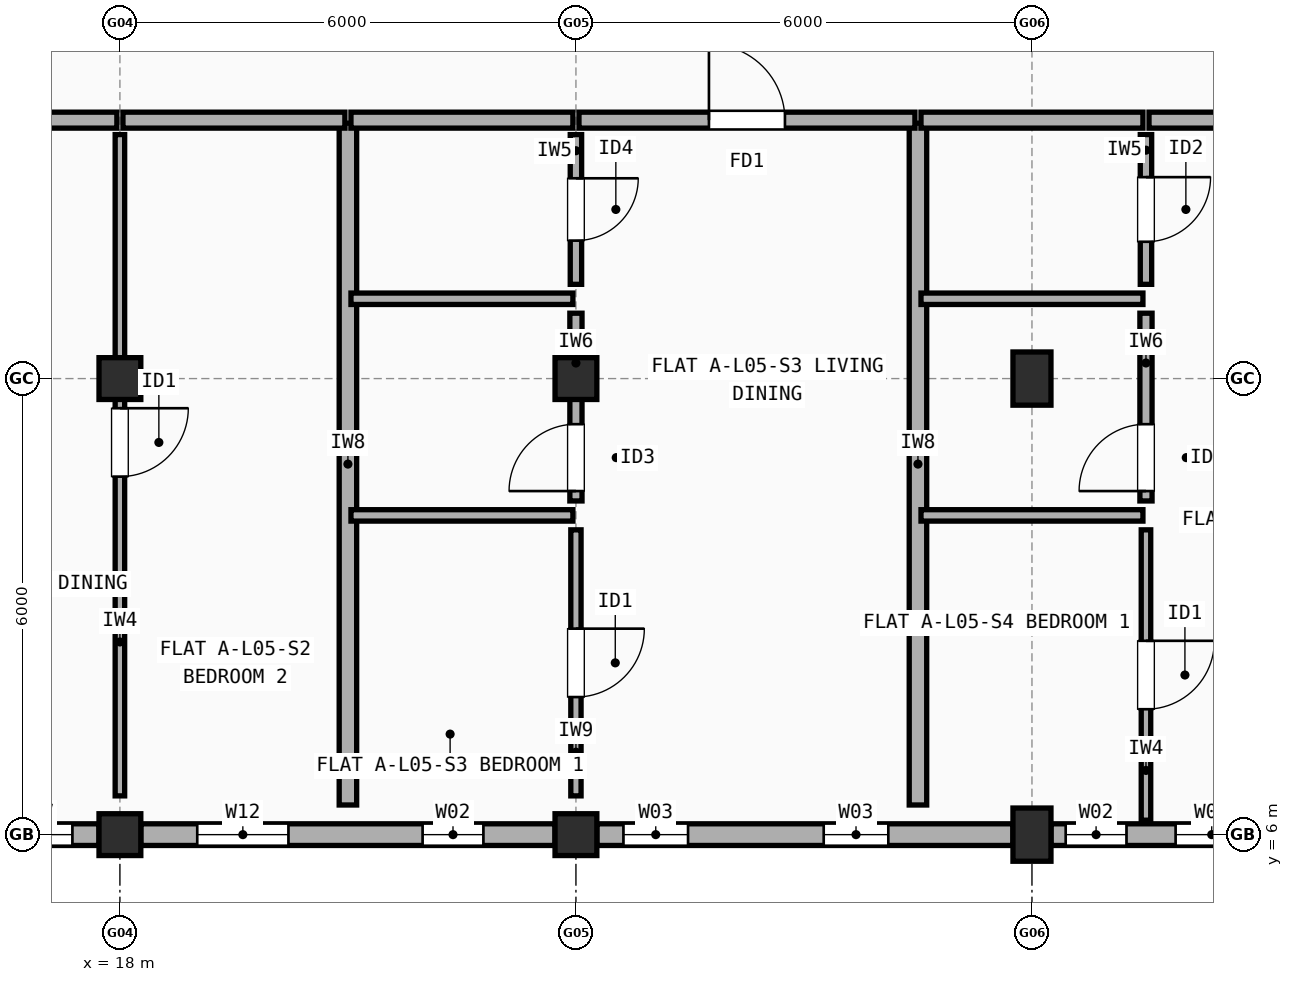
"""IFC4 building model, lengths in metres.
Left out: names, types, materials, properties, quantities, classifications, styles, units other than length and angle.
Written with IfcOpenShell. Run it as: python <this file> out.ifc"""

import sys

from ifc_helpers import new_model, si_unit, direction, frame, frame_2d, origin, origin_2d, place, context, subcontext, project, spatial, rectangle, extrude, element, fill, save


model = new_model("IFC4")
c1 = context("Model", 3, precision=1e-05, world=origin(), true_north=direction((0.0, 1.0)))
c2 = subcontext(c1, "Body", "Model", "MODEL_VIEW")
j1 = project(units=[si_unit("LENGTHUNIT", "METRE"), si_unit("PLANEANGLEUNIT", "RADIAN")], contexts=[c1])
p1 = place(None, origin())
s1 = spatial("IfcSite", under=j1, at=p1, CompositionType="ELEMENT")
p2 = place(p1, origin())
s2 = spatial("IfcBuilding", under=s1, at=p2, CompositionType="ELEMENT")
p3 = place(p2, frame((0.0, 0.0, 17.3)))
s3 = spatial("IfcBuildingStorey", under=s2, at=p3, CompositionType="ELEMENT", Elevation=17.3)
for number, where, z_axis, x_axis in (
    (1, (18.0, 6.0, 0.0), (0.0, 0.0, 1.0), (1.0, 0.0, 0.0)),
    (2, (18.0, 12.0, 0.0), (0.0, 0.0, 1.0), (1.0, 0.0, 0.0)),
    (3, (24.0, 6.0, 0.0), (0.0, 0.0, 1.0), (1.0, 0.0, 0.0)),
    (4, (24.0, 12.0, 0.0), (0.0, 0.0, 1.0), (1.0, 0.0, 0.0)),
):
    element("IfcColumn", number, at=place(p3, frame(where, z_axis=z_axis, x_axis=x_axis)), inside=s3, PredefinedType="COLUMN", context=c2, shape_type="SweptSolid", body=[
        extrude(rectangle(XDim=0.55, YDim=0.55, at=origin_2d()), origin(), (0.0, 0.0, 1.0), 2.965),
    ])
for number, where, z_axis, x_axis in (
    (5, (30.0, 6.0, 0.0), (0.0, 0.0, 1.0), (1.0, 0.0, 0.0)),
    (6, (30.0, 12.0, 0.0), (0.0, 0.0, 1.0), (1.0, 0.0, 0.0)),
):
    element("IfcColumn", number, at=place(p3, frame(where, z_axis=z_axis, x_axis=x_axis)), inside=s3, PredefinedType="COLUMN", context=c2, shape_type="SweptSolid", body=[
        extrude(rectangle(XDim=0.5, YDim=0.7, at=origin_2d()), origin(), (0.0, 0.0, 1.0), 2.965),
    ])
p4 = place(p3, frame((12.275, 6.0, 0.0), z_axis=(0.0, 0.0, 1.0), x_axis=(1.0, 0.0, 0.0)))
e7 = element("IfcWall", 7, at=p4, inside=s3, PredefinedType="STANDARD", context=c2, shape_type="SweptSolid", body=[
    extrude(rectangle(XDim=5.45, YDim=0.285, at=frame_2d((2.725, 0.0))), origin(), (0.0, 0.0, 1.0), 2.447),
])
p5 = place(p4, frame((1.615, 0.0, 0.9)))
e8 = element("IfcOpeningElement", 8, at=p5, cuts=e7, PredefinedType="OPENING", context=c2, shape_type="SweptSolid", body=[
    extrude(rectangle(XDim=0.95, YDim=1.35, at=frame_2d((0.475, 0.675))), frame((0.0, 0.152, 0.0), z_axis=(0.0, -1.0, 0.0), x_axis=(1.0, 0.0, 0.0)), (0.0, 0.0, 1.0), 0.305),
])
p6 = place(p4, frame((4.15, 0.0, 0.9)))
e9 = element("IfcOpeningElement", 9, at=p6, cuts=e7, PredefinedType="OPENING", context=c2, shape_type="SweptSolid", body=[
    extrude(rectangle(XDim=0.95, YDim=1.35, at=frame_2d((0.475, 0.675))), frame((0.0, 0.152, 0.0), z_axis=(0.0, -1.0, 0.0), x_axis=(1.0, 0.0, 0.0)), (0.0, 0.0, 1.0), 0.305),
])
p7 = place(p3, frame((18.275, 6.0, 0.0), z_axis=(0.0, 0.0, 1.0), x_axis=(1.0, 0.0, 0.0)))
e10 = element("IfcWall", 10, at=p7, inside=s3, PredefinedType="STANDARD", context=c2, shape_type="SweptSolid", body=[
    extrude(rectangle(XDim=5.45, YDim=0.285, at=frame_2d((2.725, 0.0))), origin(), (0.0, 0.0, 1.0), 2.447),
])
p8 = place(p7, frame((0.742, 0.0, 0.9)))
e11 = element("IfcOpeningElement", 11, at=p8, cuts=e10, PredefinedType="OPENING", context=c2, shape_type="SweptSolid", body=[
    extrude(rectangle(XDim=1.2, YDim=1.35, at=frame_2d((0.6, 0.675))), frame((0.0, 0.152, 0.0), z_axis=(0.0, -1.0, 0.0), x_axis=(1.0, 0.0, 0.0)), (0.0, 0.0, 1.0), 0.305),
])
p9 = place(p7, frame((3.708, 0.0, 0.9)))
e12 = element("IfcOpeningElement", 12, at=p9, cuts=e10, PredefinedType="OPENING", context=c2, shape_type="SweptSolid", body=[
    extrude(rectangle(XDim=0.8, YDim=1.2, at=frame_2d((0.4, 0.6))), frame((0.0, 0.152, 0.0), z_axis=(0.0, -1.0, 0.0), x_axis=(1.0, 0.0, 0.0)), (0.0, 0.0, 1.0), 0.305),
])
p10 = place(p3, frame((24.275, 6.0, 0.0), z_axis=(0.0, 0.0, 1.0), x_axis=(1.0, 0.0, 0.0)))
e13 = element("IfcWall", 13, at=p10, inside=s3, PredefinedType="STANDARD", context=c2, shape_type="SweptSolid", body=[
    extrude(rectangle(XDim=5.475, YDim=0.285, at=frame_2d((2.738, 0.0))), origin(), (0.0, 0.0, 1.0), 2.447),
])
p11 = place(p10, frame((0.35, 0.0, 0.9)))
e14 = element("IfcOpeningElement", 14, at=p11, cuts=e13, PredefinedType="OPENING", context=c2, shape_type="SweptSolid", body=[
    extrude(rectangle(XDim=0.85, YDim=1.25, at=frame_2d((0.425, 0.625))), frame((0.0, 0.152, 0.0), z_axis=(0.0, -1.0, 0.0), x_axis=(1.0, 0.0, 0.0)), (0.0, 0.0, 1.0), 0.305),
])
p12 = place(p10, frame((2.985, 0.0, 0.9)))
e15 = element("IfcOpeningElement", 15, at=p12, cuts=e13, PredefinedType="OPENING", context=c2, shape_type="SweptSolid", body=[
    extrude(rectangle(XDim=0.85, YDim=1.25, at=frame_2d((0.425, 0.625))), frame((0.0, 0.152, 0.0), z_axis=(0.0, -1.0, 0.0), x_axis=(1.0, 0.0, 0.0)), (0.0, 0.0, 1.0), 0.305),
])
p13 = place(p3, frame((30.25, 6.0, 0.0), z_axis=(0.0, 0.0, 1.0), x_axis=(1.0, 0.0, 0.0)))
e16 = element("IfcWall", 16, at=p13, inside=s3, PredefinedType="STANDARD", context=c2, shape_type="SweptSolid", body=[
    extrude(rectangle(XDim=5.5, YDim=0.285, at=frame_2d((2.75, 0.0))), origin(), (0.0, 0.0, 1.0), 2.447),
])
p14 = place(p13, frame((1.64, 0.0, 0.9)))
e17 = element("IfcOpeningElement", 17, at=p14, cuts=e16, PredefinedType="OPENING", context=c2, shape_type="SweptSolid", body=[
    extrude(rectangle(XDim=0.95, YDim=1.35, at=frame_2d((0.475, 0.675))), frame((0.0, 0.152, 0.0), z_axis=(0.0, -1.0, 0.0), x_axis=(1.0, 0.0, 0.0)), (0.0, 0.0, 1.0), 0.305),
])
p15 = place(p13, frame((4.2, 0.0, 0.9)))
e18 = element("IfcOpeningElement", 18, at=p15, cuts=e16, PredefinedType="OPENING", context=c2, shape_type="SweptSolid", body=[
    extrude(rectangle(XDim=0.95, YDim=1.35, at=frame_2d((0.475, 0.675))), frame((0.0, 0.152, 0.0), z_axis=(0.0, -1.0, 0.0), x_axis=(1.0, 0.0, 0.0)), (0.0, 0.0, 1.0), 0.305),
])
p16 = place(p13, frame((0.194, 0.0, 0.9)))
e19 = element("IfcOpeningElement", 19, at=p16, cuts=e16, PredefinedType="OPENING", context=c2, shape_type="SweptSolid", body=[
    extrude(rectangle(XDim=0.8, YDim=1.2, at=frame_2d((0.4, 0.6))), frame((0.0, 0.152, 0.0), z_axis=(0.0, -1.0, 0.0), x_axis=(1.0, 0.0, 0.0)), (0.0, 0.0, 1.0), 0.305),
])
p17 = place(p3, frame((21.0, 6.39, 0.0), z_axis=(0.0, 0.0, 1.0), x_axis=(0.0, 1.0, 0.0)))
e20 = element("IfcWall", 20, at=p17, inside=s3, PredefinedType="SOLIDWALL", context=c2, shape_type="SweptSolid", body=[
    extrude(rectangle(XDim=8.97, YDim=0.23, at=frame_2d((4.485, 0.0))), origin(), (0.0, 0.0, 1.0), 2.408),
])
p18 = place(p3, frame((13.54, 15.4, 0.0), z_axis=(0.0, 0.0, 1.0), x_axis=(1.0, 0.0, 0.0)))
e21 = element("IfcWall", 21, at=p18, inside=s3, PredefinedType="SOLIDWALL", context=c2, shape_type="SweptSolid", body=[
    extrude(rectangle(XDim=4.42, YDim=0.21, at=frame_2d((2.21, 0.0))), origin(), (0.0, 0.0, 1.0), 2.508),
])
p19 = place(p18, frame((1.72, 0.0, 0.0)))
e22 = element("IfcOpeningElement", 22, at=p19, cuts=e21, PredefinedType="OPENING", context=c2, shape_type="SweptSolid", body=[
    extrude(rectangle(XDim=0.98, YDim=2.15, at=frame_2d((0.49, 1.075))), frame((0.0, 0.115, 0.0), z_axis=(0.0, -1.0, 0.0), x_axis=(1.0, 0.0, 0.0)), (0.0, 0.0, 1.0), 0.23),
])
p20 = place(p3, frame((18.04, 15.4, 0.0), z_axis=(0.0, 0.0, 1.0), x_axis=(1.0, 0.0, 0.0)))
e23 = element("IfcWall", 23, at=p20, inside=s3, PredefinedType="SOLIDWALL", context=c2, shape_type="SweptSolid", body=[
    extrude(rectangle(XDim=2.92, YDim=0.21, at=frame_2d((1.46, 0.0))), origin(), (0.0, 0.0, 1.0), 2.508),
])
p21 = place(p3, frame((18.0, 6.51, 0.0), z_axis=(0.0, 0.0, 1.0), x_axis=(0.0, 1.0, 0.0)))
e24 = element("IfcWall", 24, at=p21, inside=s3, PredefinedType="PARTITIONING", context=c2, shape_type="SweptSolid", body=[
    extrude(rectangle(XDim=8.7, YDim=0.125, at=frame_2d((4.35, 0.0))), origin(), (0.0, 0.0, 1.0), 2.508),
])
p22 = place(p21, frame((4.2, 0.0, 0.0)))
e25 = element("IfcOpeningElement", 25, at=p22, cuts=e24, PredefinedType="OPENING", context=c2, shape_type="SweptSolid", body=[
    extrude(rectangle(XDim=0.9, YDim=2.1, at=frame_2d((0.45, 1.05))), frame((0.0, 0.073, 0.0), z_axis=(0.0, -1.0, 0.0), x_axis=(1.0, 0.0, 0.0)), (0.0, 0.0, 1.0), 0.145),
])
p23 = place(p3, frame((28.5, 6.39, 0.0), z_axis=(0.0, 0.0, 1.0), x_axis=(0.0, 1.0, 0.0)))
e26 = element("IfcWall", 26, at=p23, inside=s3, PredefinedType="SOLIDWALL", context=c2, shape_type="SweptSolid", body=[
    extrude(rectangle(XDim=8.97, YDim=0.23, at=frame_2d((4.485, 0.0))), origin(), (0.0, 0.0, 1.0), 2.548),
])
p24 = place(p3, frame((21.04, 15.4, 0.0), z_axis=(0.0, 0.0, 1.0), x_axis=(1.0, 0.0, 0.0)))
e27 = element("IfcWall", 27, at=p24, inside=s3, PredefinedType="SOLIDWALL", context=c2, shape_type="SweptSolid", body=[
    extrude(rectangle(XDim=2.92, YDim=0.21, at=frame_2d((1.46, 0.0))), origin(), (0.0, 0.0, 1.0), 2.458),
])
p25 = place(p3, frame((24.04, 15.4, 0.0), z_axis=(0.0, 0.0, 1.0), x_axis=(1.0, 0.0, 0.0)))
e28 = element("IfcWall", 28, at=p25, inside=s3, PredefinedType="SOLIDWALL", context=c2, shape_type="SweptSolid", body=[
    extrude(rectangle(XDim=4.42, YDim=0.21, at=frame_2d((2.21, 0.0))), origin(), (0.0, 0.0, 1.0), 2.458),
])
p26 = place(p25, frame((1.71, 0.0, 0.0)))
e29 = element("IfcOpeningElement", 29, at=p26, cuts=e28, PredefinedType="OPENING", context=c2, shape_type="SweptSolid", body=[
    extrude(rectangle(XDim=1.0, YDim=2.15, at=frame_2d((0.5, 1.075))), frame((0.0, 0.115, 0.0), z_axis=(0.0, -1.0, 0.0), x_axis=(1.0, 0.0, 0.0)), (0.0, 0.0, 1.0), 0.23),
])
p27 = place(p3, frame((24.0, 6.51, 0.0), z_axis=(0.0, 0.0, 1.0), x_axis=(0.0, 1.0, 0.0)))
e30 = element("IfcWall", 30, at=p27, inside=s3, PredefinedType="PARTITIONING", context=c2, shape_type="SweptSolid", body=[
    extrude(rectangle(XDim=3.5, YDim=0.135, at=frame_2d((1.75, 0.0))), origin(), (0.0, 0.0, 1.0), 2.508),
])
p28 = place(p27, frame((1.3, 0.0, 0.0)))
e31 = element("IfcOpeningElement", 31, at=p28, cuts=e30, PredefinedType="OPENING", context=c2, shape_type="SweptSolid", body=[
    extrude(rectangle(XDim=0.9, YDim=2.1, at=frame_2d((0.45, 1.05))), frame((0.0, 0.077, 0.0), z_axis=(0.0, -1.0, 0.0), x_axis=(1.0, 0.0, 0.0)), (0.0, 0.0, 1.0), 0.155),
])
p29 = place(p3, frame((24.0, 10.39, 0.0), z_axis=(0.0, 0.0, 1.0), x_axis=(0.0, 1.0, 0.0)))
e32 = element("IfcWall", 32, at=p29, inside=s3, PredefinedType="PLUMBINGWALL", context=c2, shape_type="SweptSolid", body=[
    extrude(rectangle(XDim=2.47, YDim=0.16, at=frame_2d((1.235, 0.0))), origin(), (0.0, 0.0, 1.0), 2.458),
])
p30 = place(p29, frame((0.13, 0.0, 0.0)))
e33 = element("IfcOpeningElement", 33, at=p30, cuts=e32, PredefinedType="OPENING", context=c2, shape_type="SweptSolid", body=[
    extrude(rectangle(XDim=0.88, YDim=2.1, at=frame_2d((0.44, 1.05))), frame((0.0, 0.09, 0.0), z_axis=(0.0, -1.0, 0.0), x_axis=(1.0, 0.0, 0.0)), (0.0, 0.0, 1.0), 0.18),
])
p31 = place(p3, frame((24.0, 13.24, 0.0), z_axis=(0.0, 0.0, 1.0), x_axis=(0.0, 1.0, 0.0)))
e34 = element("IfcWall", 34, at=p31, inside=s3, PredefinedType="PARTITIONING", context=c2, shape_type="SweptSolid", body=[
    extrude(rectangle(XDim=1.97, YDim=0.15, at=frame_2d((0.985, 0.0))), origin(), (0.0, 0.0, 1.0), 2.458),
])
p32 = place(p31, frame((0.575, 0.0, 0.0)))
e35 = element("IfcOpeningElement", 35, at=p32, cuts=e34, PredefinedType="OPENING", context=c2, shape_type="SweptSolid", body=[
    extrude(rectangle(XDim=0.82, YDim=2.08, at=frame_2d((0.41, 1.04))), frame((0.0, 0.085, 0.0), z_axis=(0.0, -1.0, 0.0), x_axis=(1.0, 0.0, 0.0)), (0.0, 0.0, 1.0), 0.17),
])
p33 = place(p3, frame((21.04, 10.2, 0.0), z_axis=(0.0, 0.0, 1.0), x_axis=(1.0, 0.0, 0.0)))
e36 = element("IfcWall", 36, at=p33, inside=s3, PredefinedType="PARTITIONING", context=c2, shape_type="SweptSolid", body=[
    extrude(rectangle(XDim=2.92, YDim=0.15, at=frame_2d((1.46, 0.0))), origin(), (0.0, 0.0, 1.0), 2.508),
])
p34 = place(p3, frame((21.04, 13.05, 0.0), z_axis=(0.0, 0.0, 1.0), x_axis=(1.0, 0.0, 0.0)))
e37 = element("IfcWall", 37, at=p34, inside=s3, PredefinedType="PARTITIONING", context=c2, shape_type="SweptSolid", body=[
    extrude(rectangle(XDim=2.92, YDim=0.15, at=frame_2d((1.46, 0.0))), origin(), (0.0, 0.0, 1.0), 2.458),
])
p35 = place(p3, frame((28.54, 15.4, 0.0), z_axis=(0.0, 0.0, 1.0), x_axis=(1.0, 0.0, 0.0)))
e38 = element("IfcWall", 38, at=p35, inside=s3, PredefinedType="SOLIDWALL", context=c2, shape_type="SweptSolid", body=[
    extrude(rectangle(XDim=2.92, YDim=0.21, at=frame_2d((1.46, 0.0))), origin(), (0.0, 0.0, 1.0), 2.447),
])
p36 = place(p3, frame((31.54, 15.4, 0.0), z_axis=(0.0, 0.0, 1.0), x_axis=(1.0, 0.0, 0.0)))
e39 = element("IfcWall", 39, at=p36, inside=s3, PredefinedType="SOLIDWALL", context=c2, shape_type="SweptSolid", body=[
    extrude(rectangle(XDim=4.42, YDim=0.21, at=frame_2d((2.21, 0.0))), origin(), (0.0, 0.0, 1.0), 2.447),
])
p37 = place(p36, frame((1.72, 0.0, 0.0)))
e40 = element("IfcOpeningElement", 40, at=p37, cuts=e39, PredefinedType="OPENING", context=c2, shape_type="SweptSolid", body=[
    extrude(rectangle(XDim=0.98, YDim=2.15, at=frame_2d((0.49, 1.075))), frame((0.0, 0.115, 0.0), z_axis=(0.0, -1.0, 0.0), x_axis=(1.0, 0.0, 0.0)), (0.0, 0.0, 1.0), 0.23),
])
p38 = place(p3, frame((31.5, 6.19, 0.0), z_axis=(0.0, 0.0, 1.0), x_axis=(0.0, 1.0, 0.0)))
e41 = element("IfcWall", 41, at=p38, inside=s3, PredefinedType="PARTITIONING", context=c2, shape_type="SweptSolid", body=[
    extrude(rectangle(XDim=3.82, YDim=0.125, at=frame_2d((1.91, 0.0))), origin(), (0.0, 0.0, 1.0), 2.965),
])
p39 = place(p38, frame((1.46, 0.0, 0.0)))
e42 = element("IfcOpeningElement", 42, at=p39, cuts=e41, PredefinedType="OPENING", context=c2, shape_type="SweptSolid", body=[
    extrude(rectangle(XDim=0.9, YDim=2.1, at=frame_2d((0.45, 1.05))), frame((0.0, 0.073, 0.0), z_axis=(0.0, -1.0, 0.0), x_axis=(1.0, 0.0, 0.0)), (0.0, 0.0, 1.0), 0.145),
])
p40 = place(p3, frame((31.5, 10.39, 0.0), z_axis=(0.0, 0.0, 1.0), x_axis=(0.0, 1.0, 0.0)))
e43 = element("IfcWall", 43, at=p40, inside=s3, PredefinedType="PLUMBINGWALL", context=c2, shape_type="SweptSolid", body=[
    extrude(rectangle(XDim=2.47, YDim=0.16, at=frame_2d((1.235, 0.0))), origin(), (0.0, 0.0, 1.0), 2.508),
])
p41 = place(p40, frame((0.13, 0.0, 0.0)))
e44 = element("IfcOpeningElement", 44, at=p41, cuts=e43, PredefinedType="OPENING", context=c2, shape_type="SweptSolid", body=[
    extrude(rectangle(XDim=0.88, YDim=2.1, at=frame_2d((0.44, 1.05))), frame((0.0, 0.09, 0.0), z_axis=(0.0, -1.0, 0.0), x_axis=(1.0, 0.0, 0.0)), (0.0, 0.0, 1.0), 0.18),
])
p42 = place(p3, frame((31.5, 13.24, 0.0), z_axis=(0.0, 0.0, 1.0), x_axis=(0.0, 1.0, 0.0)))
e45 = element("IfcWall", 45, at=p42, inside=s3, PredefinedType="PARTITIONING", context=c2, shape_type="SweptSolid", body=[
    extrude(rectangle(XDim=1.97, YDim=0.15, at=frame_2d((0.985, 0.0))), origin(), (0.0, 0.0, 1.0), 2.965),
])
p43 = place(p42, frame((0.56, 0.0, 0.0)))
e46 = element("IfcOpeningElement", 46, at=p43, cuts=e45, PredefinedType="OPENING", context=c2, shape_type="SweptSolid", body=[
    extrude(rectangle(XDim=0.85, YDim=2.1, at=frame_2d((0.425, 1.05))), frame((0.0, 0.085, 0.0), z_axis=(0.0, -1.0, 0.0), x_axis=(1.0, 0.0, 0.0)), (0.0, 0.0, 1.0), 0.17),
])
for number, where, z_axis, x_axis in (
    (47, (28.54, 10.2, 0.0), (0.0, 0.0, 1.0), (1.0, 0.0, 0.0)),
    (48, (28.54, 13.05, 0.0), (0.0, 0.0, 1.0), (1.0, 0.0, 0.0)),
):
    element("IfcWall", number, at=place(p3, frame(where, z_axis=z_axis, x_axis=x_axis)), inside=s3, PredefinedType="PARTITIONING", context=c2, shape_type="SweptSolid", body=[
        extrude(rectangle(XDim=2.92, YDim=0.15, at=frame_2d((1.46, 0.0))), origin(), (0.0, 0.0, 1.0), 2.447),
    ])
p44 = place(p6, origin())
e49 = element("IfcWindow", 49, at=p44, inside=s3, PartitioningType="SINGLE_PANEL", PredefinedType="WINDOW", context=c2, shape_type="SweptSolid", body=[
    extrude(rectangle(XDim=0.95, YDim=1.35, at=frame_2d((0.475, 0.675))), frame((0.0, 0.03, 0.0), z_axis=(0.0, -1.0, 0.0), x_axis=(1.0, 0.0, 0.0)), (0.0, 0.0, 1.0), 0.06),
])
fill(e9, e49)
p45 = place(p8, origin())
e50 = element("IfcWindow", 50, at=p45, inside=s3, PartitioningType="SINGLE_PANEL", PredefinedType="WINDOW", context=c2, shape_type="SweptSolid", body=[
    extrude(rectangle(XDim=1.2, YDim=1.35, at=frame_2d((0.6, 0.675))), frame((0.0, 0.03, 0.0), z_axis=(0.0, -1.0, 0.0), x_axis=(1.0, 0.0, 0.0)), (0.0, 0.0, 1.0), 0.06),
])
fill(e11, e50)
p46 = place(p9, origin())
e51 = element("IfcWindow", 51, at=p46, inside=s3, PartitioningType="SINGLE_PANEL", PredefinedType="WINDOW", context=c2, shape_type="SweptSolid", body=[
    extrude(rectangle(XDim=0.8, YDim=1.2, at=frame_2d((0.4, 0.6))), frame((0.0, 0.03, 0.0), z_axis=(0.0, -1.0, 0.0), x_axis=(1.0, 0.0, 0.0)), (0.0, 0.0, 1.0), 0.06),
])
fill(e12, e51)
p47 = place(p11, origin())
e52 = element("IfcWindow", 52, at=p47, inside=s3, PartitioningType="SINGLE_PANEL", PredefinedType="WINDOW", context=c2, shape_type="SweptSolid", body=[
    extrude(rectangle(XDim=0.85, YDim=1.25, at=frame_2d((0.425, 0.625))), frame((0.0, 0.03, 0.0), z_axis=(0.0, -1.0, 0.0), x_axis=(1.0, 0.0, 0.0)), (0.0, 0.0, 1.0), 0.06),
])
fill(e14, e52)
p48 = place(p12, origin())
e53 = element("IfcWindow", 53, at=p48, inside=s3, PartitioningType="SINGLE_PANEL", PredefinedType="WINDOW", context=c2, shape_type="SweptSolid", body=[
    extrude(rectangle(XDim=0.85, YDim=1.25, at=frame_2d((0.425, 0.625))), frame((0.0, 0.03, 0.0), z_axis=(0.0, -1.0, 0.0), x_axis=(1.0, 0.0, 0.0)), (0.0, 0.0, 1.0), 0.06),
])
fill(e15, e53)
p49 = place(p14, origin())
e54 = element("IfcWindow", 54, at=p49, inside=s3, PartitioningType="SINGLE_PANEL", PredefinedType="WINDOW", context=c2, shape_type="SweptSolid", body=[
    extrude(rectangle(XDim=0.95, YDim=1.35, at=frame_2d((0.475, 0.675))), frame((0.0, 0.03, 0.0), z_axis=(0.0, -1.0, 0.0), x_axis=(1.0, 0.0, 0.0)), (0.0, 0.0, 1.0), 0.06),
])
fill(e17, e54)
p50 = place(p16, origin())
e55 = element("IfcWindow", 55, at=p50, inside=s3, PartitioningType="SINGLE_PANEL", PredefinedType="WINDOW", context=c2, shape_type="SweptSolid", body=[
    extrude(rectangle(XDim=0.8, YDim=1.2, at=frame_2d((0.4, 0.6))), frame((0.0, 0.03, 0.0), z_axis=(0.0, -1.0, 0.0), x_axis=(1.0, 0.0, 0.0)), (0.0, 0.0, 1.0), 0.06),
])
fill(e19, e55)
p51 = place(p22, origin())
e56 = element("IfcDoor", 56, at=p51, inside=s3, OperationType="SINGLE_SWING_RIGHT", PredefinedType="DOOR", context=c2, shape_type="SweptSolid", body=[
    extrude(rectangle(XDim=0.9, YDim=2.1, at=frame_2d((0.45, 1.05))), frame((0.0, 0.025, 0.0), z_axis=(0.0, -1.0, 0.0), x_axis=(1.0, 0.0, 0.0)), (0.0, 0.0, 1.0), 0.05),
])
fill(e25, e56)
p52 = place(p26, origin())
e57 = element("IfcDoor", 57, at=p52, inside=s3, OperationType="SINGLE_SWING_LEFT", PredefinedType="DOOR", context=c2, shape_type="SweptSolid", body=[
    extrude(rectangle(XDim=1.0, YDim=2.15, at=frame_2d((0.5, 1.075))), frame((0.0, 0.025, 0.0), z_axis=(0.0, -1.0, 0.0), x_axis=(1.0, 0.0, 0.0)), (0.0, 0.0, 1.0), 0.05),
])
fill(e29, e57)
p53 = place(p28, origin())
e58 = element("IfcDoor", 58, at=p53, inside=s3, OperationType="SINGLE_SWING_RIGHT", PredefinedType="DOOR", context=c2, shape_type="SweptSolid", body=[
    extrude(rectangle(XDim=0.9, YDim=2.1, at=frame_2d((0.45, 1.05))), frame((0.0, 0.025, 0.0), z_axis=(0.0, -1.0, 0.0), x_axis=(1.0, 0.0, 0.0)), (0.0, 0.0, 1.0), 0.05),
])
fill(e31, e58)
p54 = place(p30, origin())
e59 = element("IfcDoor", 59, at=p54, inside=s3, OperationType="SINGLE_SWING_LEFT", PredefinedType="DOOR", context=c2, shape_type="SweptSolid", body=[
    extrude(rectangle(XDim=0.88, YDim=2.1, at=frame_2d((0.44, 1.05))), frame((0.0, 0.025, 0.0), z_axis=(0.0, -1.0, 0.0), x_axis=(1.0, 0.0, 0.0)), (0.0, 0.0, 1.0), 0.05),
])
fill(e33, e59)
p55 = place(p32, origin())
e60 = element("IfcDoor", 60, at=p55, inside=s3, OperationType="SINGLE_SWING_RIGHT", PredefinedType="DOOR", context=c2, shape_type="SweptSolid", body=[
    extrude(rectangle(XDim=0.82, YDim=2.08, at=frame_2d((0.41, 1.04))), frame((0.0, 0.025, 0.0), z_axis=(0.0, -1.0, 0.0), x_axis=(1.0, 0.0, 0.0)), (0.0, 0.0, 1.0), 0.05),
])
fill(e35, e60)
p56 = place(p39, origin())
e61 = element("IfcDoor", 61, at=p56, inside=s3, OperationType="SINGLE_SWING_RIGHT", PredefinedType="DOOR", context=c2, shape_type="SweptSolid", body=[
    extrude(rectangle(XDim=0.9, YDim=2.1, at=frame_2d((0.45, 1.05))), frame((0.0, 0.025, 0.0), z_axis=(0.0, -1.0, 0.0), x_axis=(1.0, 0.0, 0.0)), (0.0, 0.0, 1.0), 0.05),
])
fill(e42, e61)
p57 = place(p41, origin())
e62 = element("IfcDoor", 62, at=p57, inside=s3, OperationType="SINGLE_SWING_LEFT", PredefinedType="DOOR", context=c2, shape_type="SweptSolid", body=[
    extrude(rectangle(XDim=0.88, YDim=2.1, at=frame_2d((0.44, 1.05))), frame((0.0, 0.025, 0.0), z_axis=(0.0, -1.0, 0.0), x_axis=(1.0, 0.0, 0.0)), (0.0, 0.0, 1.0), 0.05),
])
fill(e44, e62)
p58 = place(p43, origin())
e63 = element("IfcDoor", 63, at=p58, inside=s3, OperationType="SINGLE_SWING_RIGHT", PredefinedType="DOOR", context=c2, shape_type="SweptSolid", body=[
    extrude(rectangle(XDim=0.85, YDim=2.1, at=frame_2d((0.425, 1.05))), frame((0.0, 0.025, 0.0), z_axis=(0.0, -1.0, 0.0), x_axis=(1.0, 0.0, 0.0)), (0.0, 0.0, 1.0), 0.05),
])
fill(e46, e63)
save(model, sys.argv[1])
